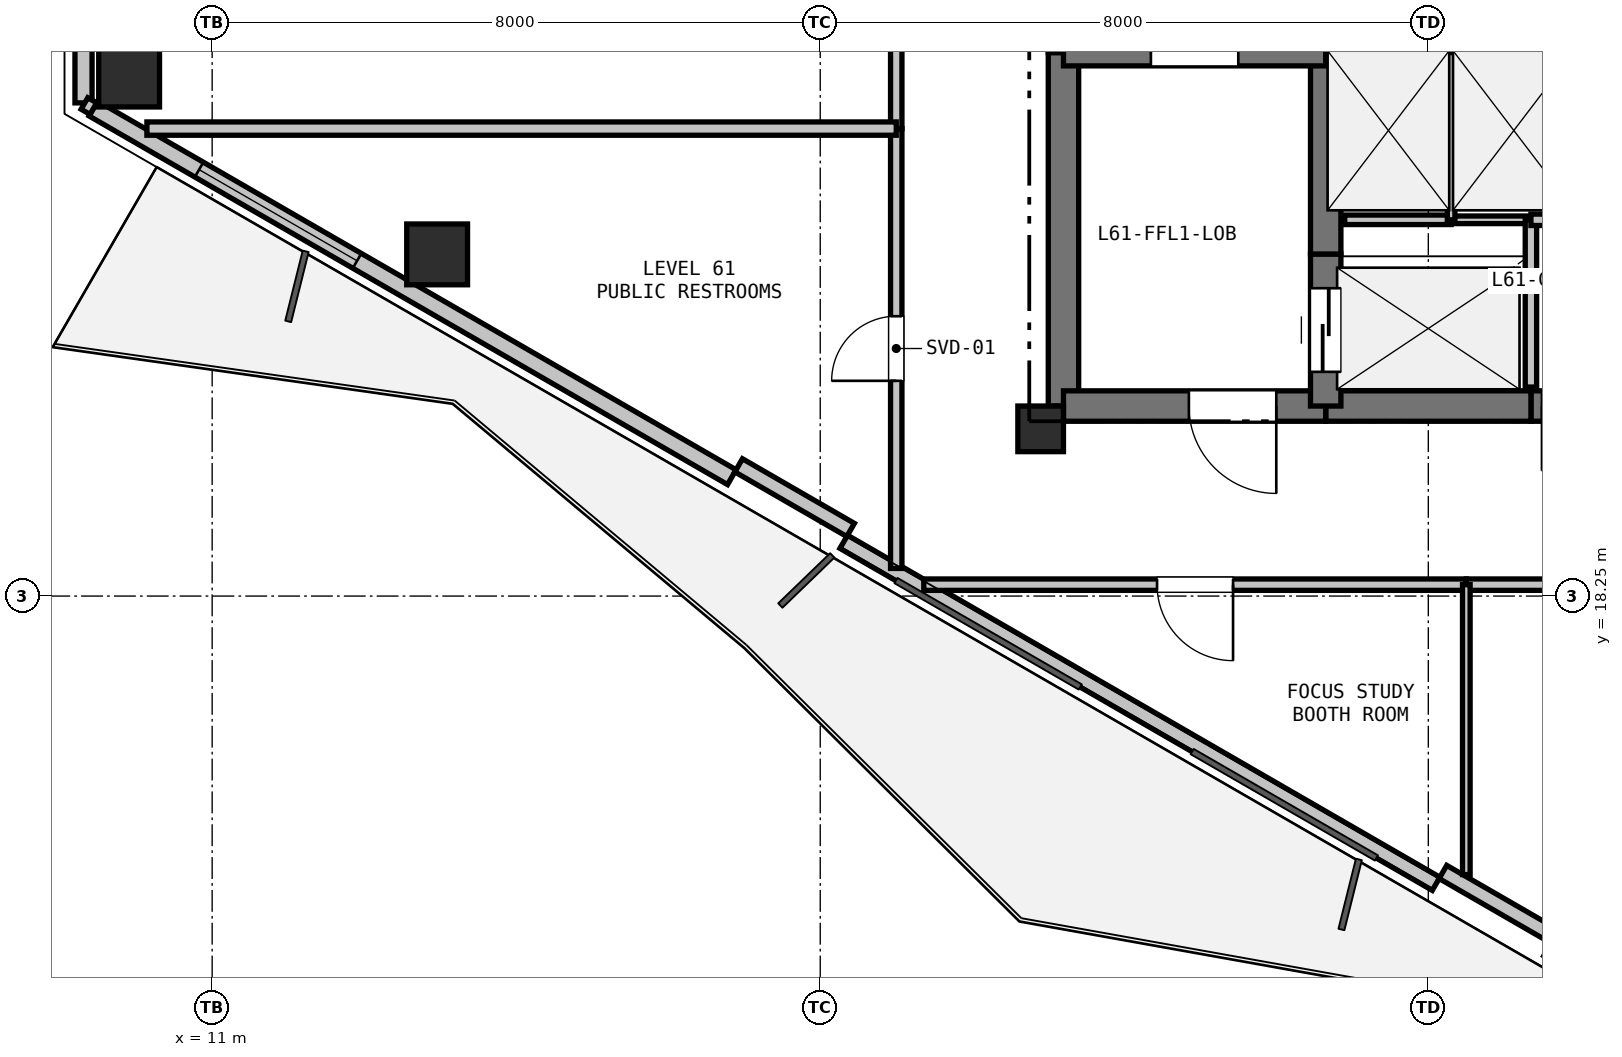
"""IFC4 building model, lengths in metres.
Left out: names, types, materials, properties, quantities, classifications, styles, units other than length and angle.
Written with IfcOpenShell. Run it as: python <this file> out.ifc"""

import sys

from ifc_helpers import new_model, si_unit, direction, frame, frame_2d, origin, origin_2d, place, context, subcontext, project, spatial, rectangle, hollow_rectangle, extrude, element, fill, save


model = new_model("IFC4")
c1 = context("Model", 3, precision=1e-05, world=origin(), true_north=direction((0.0, 1.0)))
c2 = subcontext(c1, "Body", "Model", "MODEL_VIEW")
j1 = project(units=[si_unit("LENGTHUNIT", "METRE"), si_unit("PLANEANGLEUNIT", "RADIAN")], contexts=[c1])
p1 = place(None, origin())
s1 = spatial("IfcSite", under=j1, at=p1, CompositionType="ELEMENT")
p2 = place(p1, origin())
s2 = spatial("IfcBuilding", under=s1, at=p2, CompositionType="ELEMENT")
p3 = place(p2, frame((0.0, 0.0, 218.4)))
s3 = spatial("IfcBuildingStorey", under=s2, at=p3, CompositionType="ELEMENT", Elevation=218.4)
p4 = place(p3, frame((21.9, 20.45, 0.0), z_axis=(0.0, 0.0, 1.0), x_axis=(1.0, 0.0, 0.0)))
e1 = element("IfcColumn", 1, at=p4, inside=s3, PredefinedType="COLUMN", context=c2, shape_type="SweptSolid", body=[
    extrude(rectangle(XDim=0.6, YDim=0.6, at=origin_2d()), origin(), (0.0, 0.0, 1.0), 4.8),
])
for number, where, z_axis, x_axis in (
    (2, (13.96, 22.745, 0.0), (0.0, 0.0, 1.0), (1.0, 0.0, 0.0)),
    (3, (9.907, 25.085, 0.0), (0.0, 0.0, 1.0), (1.0, 0.0, 0.0)),
):
    element("IfcColumn", number, at=place(p3, frame(where, z_axis=z_axis, x_axis=x_axis)), inside=s3, PredefinedType="COLUMN", context=c2, shape_type="SweptSolid", body=[
        extrude(hollow_rectangle(XDim=0.8, YDim=0.8, WallThickness=0.025, at=origin_2d()), origin(), (0.0, 0.0, 1.0), 3.23),
    ])
p5 = place(p3, frame((9.308, 24.738, 0.0), z_axis=(0.0, 0.0, 1.0), x_axis=(0.0, 1.0, 0.0)))
e4 = element("IfcWall", 4, at=p5, inside=s3, PredefinedType="SOLIDWALL", context=c2, shape_type="SweptSolid", body=[
    extrude(rectangle(XDim=4.023, YDim=0.225, at=frame_2d((2.012, 0.0))), origin(), (0.0, 0.0, 1.0), 4.2),
])
p6 = place(p3, frame((27.102, 14.464, 0.0), z_axis=(0.0, 0.0, 1.0), x_axis=(-0.866020680503, 0.500008180874, 0.0)))
e5 = element("IfcWall", 5, at=p6, inside=s3, PredefinedType="PARAPET", context=c2, shape_type="SweptSolid", body=[
    extrude(rectangle(XDim=8.999, YDim=0.2, at=frame_2d((4.5, 0.0))), origin(), (0.0, 0.0, 1.0), 0.2),
])
p7 = place(p3, frame((17.837, 19.814, 0.0), z_axis=(0.0, 0.0, 1.0), x_axis=(-0.866027133173, 0.499997004599, 0.0)))
e6 = element("IfcWall", 6, at=p7, inside=s3, PredefinedType="SOLIDWALL", context=c2, shape_type="SweptSolid", body=[
    extrude(rectangle(XDim=9.699, YDim=0.225, at=frame_2d((4.849, 0.0))), origin(), (0.0, 0.0, 1.0), 3.215),
])
p8 = place(p7, frame((5.693, 0.0, 0.9)))
e7 = element("IfcOpeningElement", 7, at=p8, cuts=e6, PredefinedType="OPENING", context=c2, shape_type="SweptSolid", body=[
    extrude(rectangle(XDim=2.4, YDim=2.2, at=frame_2d((1.2, 1.1))), frame((0.0, 0.123, 0.0), z_axis=(0.0, -1.0, 0.0), x_axis=(1.0, 0.0, 0.0)), (0.0, 0.0, 1.0), 0.245),
])
p9 = place(p3, frame((28.665, 13.77, 0.0), z_axis=(0.0, 0.0, 1.0), x_axis=(-0.866025371046, 0.500000056704, 0.0)))
e8 = element("IfcWall", 8, at=p9, inside=s3, PredefinedType="PARAPET", context=c2, shape_type="SweptSolid", body=[
    extrude(rectangle(XDim=1.7, YDim=0.2, at=frame_2d((0.85, 0.0))), origin(), (0.0, 0.0, 1.0), 4.2),
])
p10 = place(p3, frame((19.399, 19.12, 0.0), z_axis=(0.0, 0.0, 1.0), x_axis=(-0.86605165483, 0.499954529098, 0.0)))
e9 = element("IfcWall", 9, at=p10, inside=s3, PredefinedType="PARAPET", context=c2, shape_type="SweptSolid", body=[
    extrude(rectangle(XDim=1.7, YDim=0.2, at=frame_2d((0.85, 0.0))), origin(), (0.0, 0.0, 1.0), 4.2),
])
p11 = place(p3, frame((22.2, 20.75, 0.0), z_axis=(0.0, 0.0, 1.0), x_axis=(0.0, 1.0, 0.0)))
e10 = element("IfcWall", 10, at=p11, inside=s3, PredefinedType="SHEAR", context=c2, shape_type="SweptSolid", body=[
    extrude(rectangle(XDim=4.65, YDim=0.4, at=frame_2d((2.325, 0.0))), origin(), (0.0, 0.0, 1.0), 4.58),
])
p12 = place(p3, frame((30.6, 20.75, 0.0), z_axis=(0.0, 0.0, 1.0), x_axis=(-1.0, 0.0, 0.0)))
e11 = element("IfcWall", 11, at=p12, inside=s3, PredefinedType="SHEAR", context=c2, shape_type="SweptSolid", body=[
    extrude(rectangle(XDim=2.25, YDim=0.4, at=frame_2d((1.125, 0.0))), origin(), (0.0, 0.0, 1.0), 4.58),
])
p13 = place(p12, frame((1.255, 0.0, 0.0)))
e12 = element("IfcOpeningElement", 12, at=p13, cuts=e11, PredefinedType="OPENING", context=c2, shape_type="SweptSolid", body=[
    extrude(rectangle(XDim=0.85, YDim=2.1, at=frame_2d((0.425, 1.05))), frame((0.0, 0.21, 0.0), z_axis=(0.0, -1.0, 0.0), x_axis=(1.0, 0.0, 0.0)), (0.0, 0.0, 1.0), 0.42),
])
p14 = place(p12, frame((0.17, 0.0, 0.0)))
e13 = element("IfcOpeningElement", 13, at=p14, cuts=e11, PredefinedType="OPENING", context=c2, shape_type="SweptSolid", body=[
    extrude(rectangle(XDim=0.85, YDim=2.1, at=frame_2d((0.425, 1.05))), frame((0.0, 0.21, 0.0), z_axis=(0.0, -1.0, 0.0), x_axis=(1.0, 0.0, 0.0)), (0.0, 0.0, 1.0), 0.42),
])
p15 = place(p3, frame((28.35, 20.75, 0.0), z_axis=(0.0, 0.0, 1.0), x_axis=(-1.0, 0.0, 0.0)))
e14 = element("IfcWall", 14, at=p15, inside=s3, PredefinedType="SHEAR", context=c2, shape_type="SweptSolid", body=[
    extrude(rectangle(XDim=2.7, YDim=0.4, at=frame_2d((1.35, 0.0))), origin(), (0.0, 0.0, 1.0), 4.58),
])
p16 = place(p3, frame((25.65, 20.75, 0.0), z_axis=(0.0, 0.0, 1.0), x_axis=(-1.0, 0.0, 0.0)))
e15 = element("IfcWall", 15, at=p16, inside=s3, PredefinedType="SHEAR", context=c2, shape_type="SweptSolid", body=[
    extrude(rectangle(XDim=3.45, YDim=0.4, at=frame_2d((1.725, 0.0))), origin(), (0.0, 0.0, 1.0), 4.58),
])
p17 = place(p16, frame((0.65, 0.0, 0.0)))
e16 = element("IfcOpeningElement", 16, at=p17, cuts=e15, PredefinedType="OPENING", context=c2, shape_type="SweptSolid", body=[
    extrude(rectangle(XDim=1.15, YDim=2.15, at=frame_2d((0.575, 1.075))), frame((0.0, 0.21, 0.0), z_axis=(0.0, -1.0, 0.0), x_axis=(1.0, 0.0, 0.0)), (0.0, 0.0, 1.0), 0.42),
])
p18 = place(p3, frame((25.65, 20.75, 0.0), z_axis=(0.0, 0.0, 1.0), x_axis=(0.0, 1.0, 0.0)))
e17 = element("IfcWall", 17, at=p18, inside=s3, PredefinedType="SHEAR", context=c2, shape_type="SweptSolid", body=[
    extrude(rectangle(XDim=2.0, YDim=0.4, at=frame_2d((1.0, 0.0))), origin(), (0.0, 0.0, 1.0), 4.58),
])
p19 = place(p18, frame((0.45, 0.0, 0.0)))
e18 = element("IfcOpeningElement", 18, at=p19, cuts=e17, PredefinedType="OPENING", context=c2, shape_type="SweptSolid", body=[
    extrude(rectangle(XDim=1.1, YDim=2.15, at=frame_2d((0.55, 1.075))), frame((0.0, 0.21, 0.0), z_axis=(0.0, -1.0, 0.0), x_axis=(1.0, 0.0, 0.0)), (0.0, 0.0, 1.0), 0.42),
])
p20 = place(p3, frame((25.65, 22.75, 0.0), z_axis=(0.0, 0.0, 1.0), x_axis=(0.0, 1.0, 0.0)))
e19 = element("IfcWall", 19, at=p20, inside=s3, PredefinedType="SHEAR", context=c2, shape_type="SweptSolid", body=[
    extrude(rectangle(XDim=2.8, YDim=0.4, at=frame_2d((1.4, 0.0))), origin(), (0.0, 0.0, 1.0), 4.58),
])
p21 = place(p3, frame((22.2, 25.4, 0.0), z_axis=(0.0, 0.0, 1.0), x_axis=(1.0, 0.0, 0.0)))
e20 = element("IfcWall", 20, at=p21, inside=s3, PredefinedType="SHEAR", context=c2, shape_type="SweptSolid", body=[
    extrude(rectangle(XDim=3.45, YDim=0.35, at=frame_2d((1.725, 0.0))), origin(), (0.0, 0.0, 1.0), 4.58),
])
p22 = place(p21, frame((1.15, 0.0, 0.0)))
e21 = element("IfcOpeningElement", 21, at=p22, cuts=e20, PredefinedType="OPENING", context=c2, shape_type="SweptSolid", body=[
    extrude(rectangle(XDim=1.15, YDim=2.15, at=frame_2d((0.575, 1.075))), frame((0.0, 0.185, 0.0), z_axis=(0.0, -1.0, 0.0), x_axis=(1.0, 0.0, 0.0)), (0.0, 0.0, 1.0), 0.37),
])
p23 = place(p3, frame((25.9, 23.2, 0.0), z_axis=(0.0, 0.0, 1.0), x_axis=(1.0, 0.0, 0.0)))
e22 = element("IfcWall", 22, at=p23, inside=s3, PredefinedType="PARTITIONING", context=c2, shape_type="SweptSolid", body=[
    extrude(rectangle(XDim=1.4, YDim=0.125, at=frame_2d((0.7, 0.0))), origin(), (0.0, 0.0, 1.0), 4.58),
])
p24 = place(p3, frame((27.3, 23.2, 0.0), z_axis=(0.0, 0.0, 1.0), x_axis=(1.0, 0.0, 0.0)))
e23 = element("IfcWall", 23, at=p24, inside=s3, PredefinedType="PARTITIONING", context=c2, shape_type="SweptSolid", body=[
    extrude(rectangle(XDim=1.05, YDim=0.1, at=frame_2d((0.525, 0.0))), origin(), (0.0, 0.0, 1.0), 4.58),
])
p25 = place(p3, frame((28.35, 23.2, 0.0), z_axis=(0.0, 0.0, 1.0), x_axis=(0.0, -1.0, 0.0)))
e24 = element("IfcWall", 24, at=p25, inside=s3, PredefinedType="PARTITIONING", context=c2, shape_type="SweptSolid", body=[
    extrude(rectangle(XDim=2.2, YDim=0.15, at=frame_2d((1.1, 0.0))), origin(), (0.0, 0.0, 1.0), 4.58),
])
p26 = place(p3, frame((27.3, 25.4, 0.0), z_axis=(0.0, 0.0, 1.0), x_axis=(0.0, -1.0, 0.0)))
e25 = element("IfcWall", 25, at=p26, inside=s3, PredefinedType="PARTITIONING", context=c2, shape_type="SweptSolid", body=[
    extrude(rectangle(XDim=2.2, YDim=0.1, at=frame_2d((1.1, 0.0))), origin(), (0.0, 0.0, 1.0), 4.58),
])
p27 = place(p3, frame((28.95, 23.2, 0.0), z_axis=(0.0, 0.0, 1.0), x_axis=(-1.0, 0.0, 0.0)))
e26 = element("IfcWall", 26, at=p27, inside=s3, PredefinedType="PARTITIONING", context=c2, shape_type="SweptSolid", body=[
    extrude(rectangle(XDim=0.6, YDim=0.15, at=frame_2d((0.3, 0.0))), origin(), (0.0, 0.0, 1.0), 4.58),
])
p28 = place(p3, frame((35.8, 18.4, 0.0), z_axis=(0.0, 0.0, 1.0), x_axis=(-1.0, 0.0, 0.0)))
e27 = element("IfcWall", 27, at=p28, inside=s3, PredefinedType="PARTITIONING", context=c2, shape_type="SweptSolid", body=[
    extrude(rectangle(XDim=8.3, YDim=0.15, at=frame_2d((4.15, 0.0))), origin(), (0.0, 0.0, 1.0), 3.215),
])
p29 = place(p28, frame((3.25, 0.0, 0.0)))
e28 = element("IfcOpeningElement", 28, at=p29, cuts=e27, PredefinedType="OPENING", context=c2, shape_type="SweptSolid", body=[
    extrude(rectangle(XDim=1.8, YDim=2.2, at=frame_2d((0.9, 1.1))), frame((0.0, 0.085, 0.0), z_axis=(0.0, -1.0, 0.0), x_axis=(1.0, 0.0, 0.0)), (0.0, 0.0, 1.0), 0.17),
])
p30 = place(p3, frame((27.5, 18.4, 0.0), z_axis=(0.0, 0.0, 1.0), x_axis=(-1.0, 0.0, 0.0)))
e29 = element("IfcWall", 29, at=p30, inside=s3, PredefinedType="PARTITIONING", context=c2, shape_type="SweptSolid", body=[
    extrude(rectangle(XDim=7.138, YDim=0.15, at=frame_2d((3.569, 0.0))), origin(), (0.0, 0.0, 1.0), 2.365),
])
p31 = place(p30, frame((3.069, 0.0, 0.0)))
e30 = element("IfcOpeningElement", 30, at=p31, cuts=e29, PredefinedType="OPENING", context=c2, shape_type="SweptSolid", body=[
    extrude(rectangle(XDim=1.0, YDim=2.15, at=frame_2d((0.5, 1.075))), frame((0.0, 0.085, 0.0), z_axis=(0.0, -1.0, 0.0), x_axis=(1.0, 0.0, 0.0)), (0.0, 0.0, 1.0), 0.17),
])
p32 = place(p3, frame((20.0, 18.614, 0.0), z_axis=(0.0, 0.0, 1.0), x_axis=(0.0, 1.0, 0.0)))
e31 = element("IfcWall", 31, at=p32, inside=s3, PredefinedType="PARTITIONING", context=c2, shape_type="SweptSolid", body=[
    extrude(rectangle(XDim=5.786, YDim=0.15, at=frame_2d((2.893, 0.0))), origin(), (0.0, 0.0, 1.0), 2.365),
])
p33 = place(p32, frame((2.468, 0.0, 0.0)))
e32 = element("IfcOpeningElement", 32, at=p33, cuts=e31, PredefinedType="OPENING", context=c2, shape_type="SweptSolid", body=[
    extrude(rectangle(XDim=0.85, YDim=2.1, at=frame_2d((0.425, 1.05))), frame((0.0, 0.085, 0.0), z_axis=(0.0, -1.0, 0.0), x_axis=(1.0, 0.0, 0.0)), (0.0, 0.0, 1.0), 0.17),
])
p34 = place(p3, frame((20.0, 24.4, 0.0), z_axis=(0.0, 0.0, 1.0), x_axis=(0.0, 1.0, 0.0)))
e33 = element("IfcWall", 33, at=p34, inside=s3, PredefinedType="PARTITIONING", context=c2, shape_type="SweptSolid", body=[
    extrude(rectangle(XDim=4.0, YDim=0.15, at=frame_2d((2.0, 0.0))), origin(), (0.0, 0.0, 1.0), 3.215),
])
p35 = place(p34, frame((1.575, 0.0, 0.0)))
e34 = element("IfcOpeningElement", 34, at=p35, cuts=e33, PredefinedType="OPENING", context=c2, shape_type="SweptSolid", body=[
    extrude(rectangle(XDim=0.85, YDim=2.1, at=frame_2d((0.425, 1.05))), frame((0.0, 0.085, 0.0), z_axis=(0.0, -1.0, 0.0), x_axis=(1.0, 0.0, 0.0)), (0.0, 0.0, 1.0), 0.17),
])
p36 = place(p3, frame((10.142, 24.4, 0.0), z_axis=(0.0, 0.0, 1.0), x_axis=(1.0, 0.0, 0.0)))
e35 = element("IfcWall", 35, at=p36, inside=s3, PredefinedType="PLUMBINGWALL", context=c2, shape_type="SweptSolid", body=[
    extrude(rectangle(XDim=9.858, YDim=0.175, at=frame_2d((4.929, 0.0))), origin(), (0.0, 0.0, 1.0), 3.215),
])
p37 = place(p3, frame((9.437, 24.663, 0.0), z_axis=(0.0, 0.0, 1.0), x_axis=(-0.866125498941, 0.499826590014, 0.0)))
e36 = element("IfcWall", 36, at=p37, inside=s3, PredefinedType="PLUMBINGWALL", context=c2, shape_type="SweptSolid", body=[
    extrude(rectangle(XDim=0.135, YDim=0.175, at=frame_2d((0.068, 0.0))), origin(), (0.0, 0.0, 1.0), 4.58),
])
p38 = place(p3, frame((27.5, 14.586, 0.0), z_axis=(0.0, 0.0, 1.0), x_axis=(0.0, 1.0, 0.0)))
e37 = element("IfcWall", 37, at=p38, inside=s3, PredefinedType="PARTITIONING", context=c2, shape_type="SweptSolid", body=[
    extrude(rectangle(XDim=3.814, YDim=0.1, at=frame_2d((1.907, 0.0))), origin(), (0.0, 0.0, 1.0), 2.365),
])
p39 = place(p8, origin())
e38 = element("IfcWindow", 38, at=p39, inside=s3, PartitioningType="SINGLE_PANEL", PredefinedType="WINDOW", context=c2, shape_type="SweptSolid", body=[
    extrude(rectangle(XDim=2.4, YDim=2.2, at=frame_2d((1.2, 1.1))), frame((0.0, 0.03, 0.0), z_axis=(0.0, -1.0, 0.0), x_axis=(1.0, 0.0, 0.0)), (0.0, 0.0, 1.0), 0.06),
])
fill(e7, e38)
p40 = place(p19, origin())
e39 = element("IfcDoor", 39, at=p40, inside=s3, OperationType="SLIDING_TO_LEFT", PredefinedType="DOOR", context=c2, shape_type="SweptSolid", body=[
    extrude(rectangle(XDim=1.1, YDim=2.15, at=frame_2d((0.55, 1.075))), frame((0.0, 0.025, 0.0), z_axis=(0.0, -1.0, 0.0), x_axis=(1.0, 0.0, 0.0)), (0.0, 0.0, 1.0), 0.05),
])
fill(e18, e39)
p41 = place(p22, origin())
e40 = element("IfcDoor", 40, at=p41, inside=s3, OperationType="SINGLE_SWING_LEFT", PredefinedType="DOOR", context=c2, shape_type="SweptSolid", body=[
    extrude(rectangle(XDim=1.15, YDim=2.15, at=frame_2d((0.575, 1.075))), frame((0.0, 0.025, 0.0), z_axis=(0.0, -1.0, 0.0), x_axis=(1.0, 0.0, 0.0)), (0.0, 0.0, 1.0), 0.05),
])
fill(e21, e40)
p42 = place(p17, origin())
e41 = element("IfcDoor", 41, at=p42, inside=s3, OperationType="SINGLE_SWING_LEFT", PredefinedType="DOOR", context=c2, shape_type="SweptSolid", body=[
    extrude(rectangle(XDim=1.15, YDim=2.15, at=frame_2d((0.575, 1.075))), frame((0.0, 0.025, 0.0), z_axis=(0.0, -1.0, 0.0), x_axis=(1.0, 0.0, 0.0)), (0.0, 0.0, 1.0), 0.05),
])
fill(e16, e41)
p43 = place(p33, origin())
e42 = element("IfcDoor", 42, at=p43, inside=s3, OperationType="SINGLE_SWING_LEFT", PredefinedType="DOOR", context=c2, shape_type="SweptSolid", body=[
    extrude(rectangle(XDim=0.85, YDim=2.1, at=frame_2d((0.425, 1.05))), frame((0.0, 0.025, 0.0), z_axis=(0.0, -1.0, 0.0), x_axis=(1.0, 0.0, 0.0)), (0.0, 0.0, 1.0), 0.05),
])
fill(e32, e42)
p44 = place(p13, origin())
e43 = element("IfcDoor", 43, at=p44, inside=s3, OperationType="SINGLE_SWING_RIGHT", PredefinedType="DOOR", context=c2, shape_type="SweptSolid", body=[
    extrude(rectangle(XDim=0.85, YDim=2.1, at=frame_2d((0.425, 1.05))), frame((0.0, 0.025, 0.0), z_axis=(0.0, -1.0, 0.0), x_axis=(1.0, 0.0, 0.0)), (0.0, 0.0, 1.0), 0.05),
])
fill(e12, e43)
p45 = place(p31, origin())
e44 = element("IfcDoor", 44, at=p45, inside=s3, OperationType="SINGLE_SWING_LEFT", PredefinedType="DOOR", context=c2, shape_type="SweptSolid", body=[
    extrude(rectangle(XDim=1.0, YDim=2.15, at=frame_2d((0.5, 1.075))), frame((0.0, 0.025, 0.0), z_axis=(0.0, -1.0, 0.0), x_axis=(1.0, 0.0, 0.0)), (0.0, 0.0, 1.0), 0.05),
])
fill(e30, e44)
save(model, sys.argv[1])
